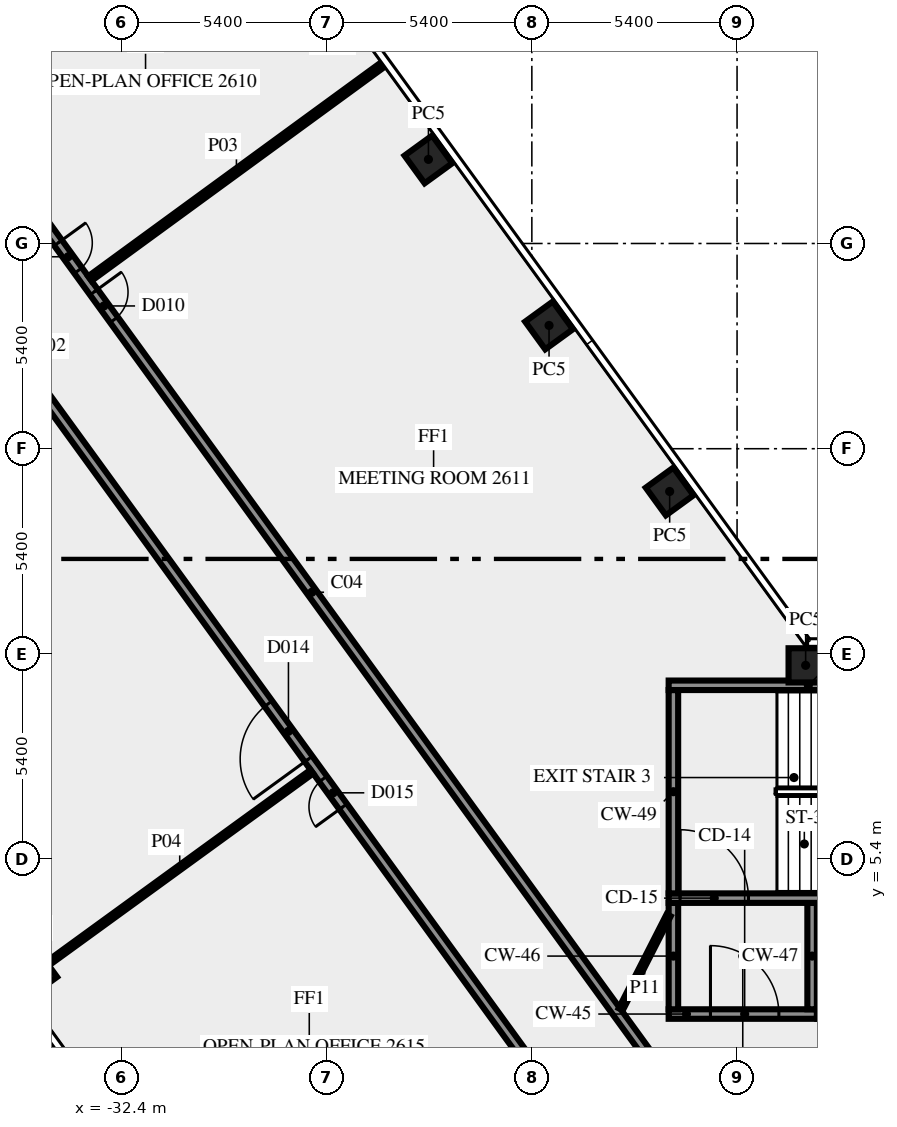
"""IFC4 building model, lengths in metres.
Left out: names, types, materials, properties, quantities, classifications, styles, units other than length and angle.
Written with IfcOpenShell. Run it as: python <this file> out.ifc"""

import sys

from ifc_helpers import new_model, si_unit, direction, frame, frame_2d, origin, origin_2d, place, context, subcontext, project, spatial, rectangle, extrude, element, fill, save


model = new_model("IFC4")
c1 = context("Model", 3, precision=1e-05, world=origin(), true_north=direction((0.0, 1.0)))
c2 = subcontext(c1, "Body", "Model", "MODEL_VIEW")
j1 = project(units=[si_unit("LENGTHUNIT", "METRE"), si_unit("PLANEANGLEUNIT", "RADIAN")], contexts=[c1])
p1 = place(None, origin())
s1 = spatial("IfcSite", under=j1, at=p1, CompositionType="ELEMENT")
p2 = place(p1, origin())
s2 = spatial("IfcBuilding", under=s1, at=p2, CompositionType="ELEMENT")
p3 = place(p2, frame((0.0, 0.0, 113.0)))
s3 = spatial("IfcBuildingStorey", under=s2, at=p3, CompositionType="ELEMENT", Elevation=113.0)
for number, where, z_axis, x_axis in (
    (1, (-17.974, 15.075, 0.0), (0.0, 0.0, 1.0), (-0.588, 0.809, 0.0)),
    (2, (-21.147, 19.444, 0.0), (0.0, 0.0, 1.0), (-0.588, 0.809, 0.0)),
    (3, (-24.321, 23.812, 0.0), (0.0, 0.0, 1.0), (-0.588, 0.809, 0.0)),
    (4, (-34.722, 2.4, 0.0), (0.0, 0.0, 1.0), (0.588, -0.809, 0.0)),
    (5, (-14.395, 10.5, 0.0), (0.0, 0.0, 1.0), (-1.0, 0.0, 0.0)),
):
    element("IfcColumn", number, at=place(p3, frame(where, z_axis=z_axis, x_axis=x_axis)), inside=s3, PredefinedType="COLUMN", context=c2, shape_type="SweptSolid", body=[
        extrude(rectangle(XDim=0.9, YDim=0.9, at=origin_2d()), origin(), (0.0, 0.0, 1.0), 3.65),
    ])
p4 = place(p3, frame((-18.0, 1.325, 0.0), z_axis=(0.0, 0.0, 1.0), x_axis=(1.0, 0.0, 0.0)))
e6 = element("IfcWall", 6, at=p4, inside=s3, PredefinedType="SHEAR", context=c2, shape_type="SweptSolid", body=[
    extrude(rectangle(XDim=3.9, YDim=0.25, at=frame_2d((1.95, 0.0))), origin(), (0.0, 0.0, 1.0), 3.65),
])
p5 = place(p4, frame((1.1, 0.0, 0.0)))
e7 = element("IfcOpeningElement", 7, at=p5, cuts=e6, PredefinedType="OPENING", context=c2, shape_type="SweptSolid", body=[
    extrude(rectangle(XDim=1.8, YDim=2.1, at=frame_2d((0.9, 1.05))), frame((0.0, 0.135, 0.0), z_axis=(0.0, -1.0, 0.0), x_axis=(1.0, 0.0, 0.0)), (0.0, 0.0, 1.0), 0.27),
])
for number, where, z_axis, x_axis in (
    (8, (-17.875, 1.45, 0.0), (0.0, 0.0, 1.0), (0.0, 1.0, 0.0)),
    (9, (-14.225, 1.45, 0.0), (0.0, 0.0, 1.0), (0.0, 1.0, 0.0)),
):
    element("IfcWall", number, at=place(p3, frame(where, z_axis=z_axis, x_axis=x_axis)), inside=s3, PredefinedType="SHEAR", context=c2, shape_type="SweptSolid", body=[
        extrude(rectangle(XDim=2.8, YDim=0.25, at=frame_2d((1.4, 0.0))), origin(), (0.0, 0.0, 1.0), 3.65),
    ])
p6 = place(p3, frame((-18.0, 4.375, 0.0), z_axis=(0.0, 0.0, 1.0), x_axis=(1.0, 0.0, 0.0)))
e10 = element("IfcWall", 10, at=p6, inside=s3, PredefinedType="SHEAR", context=c2, shape_type="SweptSolid", body=[
    extrude(rectangle(XDim=10.5, YDim=0.25, at=frame_2d((5.25, 0.0))), origin(), (0.0, 0.0, 1.0), 3.65),
])
p7 = place(p6, frame((0.3, 0.0, 0.0)))
e11 = element("IfcOpeningElement", 11, at=p7, cuts=e10, PredefinedType="OPENING", context=c2, shape_type="SweptSolid", body=[
    extrude(rectangle(XDim=1.8, YDim=2.1, at=frame_2d((0.9, 1.05))), frame((0.0, 0.135, 0.0), z_axis=(0.0, -1.0, 0.0), x_axis=(1.0, 0.0, 0.0)), (0.0, 0.0, 1.0), 0.27),
])
p8 = place(p3, frame((-17.875, 4.5, 0.0), z_axis=(0.0, 0.0, 1.0), x_axis=(0.0, 1.0, 0.0)))
e12 = element("IfcWall", 12, at=p8, inside=s3, PredefinedType="SHEAR", context=c2, shape_type="SweptSolid", body=[
    extrude(rectangle(XDim=5.35, YDim=0.25, at=frame_2d((2.675, 0.0))), origin(), (0.0, 0.0, 1.0), 3.65),
])
p9 = place(p3, frame((-18.0, 9.975, 0.0), z_axis=(0.0, 0.0, 1.0), x_axis=(1.0, 0.0, 0.0)))
e13 = element("IfcWall", 13, at=p9, inside=s3, PredefinedType="SHEAR", context=c2, shape_type="SweptSolid", body=[
    extrude(rectangle(XDim=10.5, YDim=0.25, at=frame_2d((5.25, 0.0))), origin(), (0.0, 0.0, 1.0), 3.65),
])
p10 = place(p9, frame((4.5, 0.0, 1.0)))
e14 = element("IfcOpeningElement", 14, at=p10, cuts=e13, PredefinedType="OPENING", context=c2, shape_type="SweptSolid", body=[
    extrude(rectangle(XDim=1.2, YDim=1.2, at=frame_2d((0.6, 0.6))), frame((0.0, 0.135, 0.0), z_axis=(0.0, -1.0, 0.0), x_axis=(1.0, 0.0, 0.0)), (0.0, 0.0, 1.0), 0.27),
])
p11 = place(p3, frame((-20.531, -1.523, 0.0), z_axis=(0.0, 0.0, 1.0), x_axis=(-0.587784522481, 0.809017524614, 0.0)))
e15 = element("IfcWall", 15, at=p11, inside=s3, PredefinedType="SOLIDWALL", context=c2, shape_type="SweptSolid", body=[
    extrude(rectangle(XDim=49.912, YDim=0.25, at=frame_2d((24.956, 0.0))), origin(), (0.0, 0.0, 1.0), 3.65),
])
p12 = place(p11, frame((10.266, 0.0, 0.0)))
e16 = element("IfcOpeningElement", 16, at=p12, cuts=e15, PredefinedType="OPENING", context=c2, shape_type="SweptSolid", body=[
    extrude(rectangle(XDim=0.9, YDim=2.1, at=frame_2d((0.45, 1.05))), frame((0.0, 0.135, 0.0), z_axis=(0.0, -1.0, 0.0), x_axis=(1.0, 0.0, 0.0)), (0.0, 0.0, 1.0), 0.27),
])
p13 = place(p11, frame((32.366, 0.0, 0.0)))
e17 = element("IfcOpeningElement", 17, at=p13, cuts=e15, PredefinedType="OPENING", context=c2, shape_type="SweptSolid", body=[
    extrude(rectangle(XDim=1.8, YDim=2.1, at=frame_2d((0.9, 1.05))), frame((0.0, 0.135, 0.0), z_axis=(0.0, -1.0, 0.0), x_axis=(1.0, 0.0, 0.0)), (0.0, 0.0, 1.0), 0.27),
])
p14 = place(p11, frame((11.815, 0.0, 0.0)))
e18 = element("IfcOpeningElement", 18, at=p14, cuts=e15, PredefinedType="OPENING", context=c2, shape_type="SweptSolid", body=[
    extrude(rectangle(XDim=1.8, YDim=2.1, at=frame_2d((0.9, 1.05))), frame((0.0, 0.135, 0.0), z_axis=(0.0, -1.0, 0.0), x_axis=(1.0, 0.0, 0.0)), (0.0, 0.0, 1.0), 0.27),
])
p15 = place(p11, frame((48.57, 0.0, 0.0)))
e19 = element("IfcOpeningElement", 19, at=p15, cuts=e15, PredefinedType="OPENING", context=c2, shape_type="SweptSolid", body=[
    extrude(rectangle(XDim=0.9, YDim=2.1, at=frame_2d((0.45, 1.05))), frame((0.0, 0.135, 0.0), z_axis=(0.0, -1.0, 0.0), x_axis=(1.0, 0.0, 0.0)), (0.0, 0.0, 1.0), 0.27),
])
p16 = place(p11, frame((35.915, 0.0, 0.0)))
e20 = element("IfcOpeningElement", 20, at=p16, cuts=e15, PredefinedType="OPENING", context=c2, shape_type="SweptSolid", body=[
    extrude(rectangle(XDim=0.9, YDim=2.1, at=frame_2d((0.45, 1.05))), frame((0.0, 0.135, 0.0), z_axis=(0.0, -1.0, 0.0), x_axis=(1.0, 0.0, 0.0)), (0.0, 0.0, 1.0), 0.27),
])
p17 = place(p3, frame((-37.232, 25.972, 0.0), z_axis=(0.0, 0.0, 1.0), x_axis=(0.587786323093, -0.809016216391, 0.0)))
e21 = element("IfcWall", 21, at=p17, inside=s3, PredefinedType="SOLIDWALL", context=c2, shape_type="SweptSolid", body=[
    extrude(rectangle(XDim=33.493, YDim=0.25, at=frame_2d((16.747, 0.0))), origin(), (0.0, 0.0, 1.0), 3.65),
])
p18 = place(p17, frame((5.385, 0.0, 0.0)))
e22 = element("IfcOpeningElement", 22, at=p18, cuts=e21, PredefinedType="OPENING", context=c2, shape_type="SweptSolid", body=[
    extrude(rectangle(XDim=0.9, YDim=2.1, at=frame_2d((0.45, 1.05))), frame((0.0, 0.135, 0.0), z_axis=(0.0, -1.0, 0.0), x_axis=(1.0, 0.0, 0.0)), (0.0, 0.0, 1.0), 0.27),
])
p19 = place(p17, frame((6.985, 0.0, 0.0)))
e23 = element("IfcOpeningElement", 23, at=p19, cuts=e21, PredefinedType="OPENING", context=c2, shape_type="SweptSolid", body=[
    extrude(rectangle(XDim=0.9, YDim=2.1, at=frame_2d((0.45, 1.05))), frame((0.0, 0.135, 0.0), z_axis=(0.0, -1.0, 0.0), x_axis=(1.0, 0.0, 0.0)), (0.0, 0.0, 1.0), 0.27),
])
p20 = place(p3, frame((-33.23, 20.677, 0.0), z_axis=(0.0, 0.0, 1.0), x_axis=(0.807610282865, 0.589716568371, 0.0)))
e24 = element("IfcWall", 24, at=p20, inside=s3, PredefinedType="PARTITIONING", context=c2, shape_type="SweptSolid", body=[
    extrude(rectangle(XDim=9.55, YDim=0.15, at=frame_2d((4.775, 0.0))), origin(), (0.0, 0.0, 1.0), 2.75),
])
p21 = place(p3, frame((-27.389, 7.703, 0.0), z_axis=(0.0, 0.0, 1.0), x_axis=(-0.809052894195, -0.587735837256, 0.0)))
e25 = element("IfcWall", 25, at=p21, inside=s3, PredefinedType="PARTITIONING", context=c2, shape_type="SweptSolid", body=[
    extrude(rectangle(XDim=8.594, YDim=0.12, at=frame_2d((4.297, 0.0))), origin(), (0.0, 0.0, 1.0), 3.65),
])
p22 = place(p3, frame((-19.261, 1.45, 0.0), z_axis=(0.0, 0.0, 1.0), x_axis=(0.453950796792, 0.891026752736, 0.0)))
e26 = element("IfcWall", 26, at=p22, inside=s3, PredefinedType="PARTITIONING", context=c2, shape_type="SweptSolid", body=[
    extrude(rectangle(XDim=2.778, YDim=0.12, at=frame_2d((1.389, 0.0))), origin(), (0.0, 0.0, 1.0), 3.65),
])
p23 = place(p5, origin())
e27 = element("IfcDoor", 27, at=p23, inside=s3, OperationType="DOUBLE_DOOR_SINGLE_SWING", PredefinedType="DOOR", context=c2, shape_type="SweptSolid", body=[
    extrude(rectangle(XDim=1.8, YDim=2.1, at=frame_2d((0.9, 1.05))), frame((0.0, 0.025, 0.0), z_axis=(0.0, -1.0, 0.0), x_axis=(1.0, 0.0, 0.0)), (0.0, 0.0, 1.0), 0.05),
])
fill(e7, e27)
p24 = place(p7, origin())
e28 = element("IfcDoor", 28, at=p24, inside=s3, OperationType="DOUBLE_DOOR_SINGLE_SWING", PredefinedType="DOOR", context=c2, shape_type="SweptSolid", body=[
    extrude(rectangle(XDim=1.8, YDim=2.1, at=frame_2d((0.9, 1.05))), frame((0.0, 0.025, 0.0), z_axis=(0.0, -1.0, 0.0), x_axis=(1.0, 0.0, 0.0)), (0.0, 0.0, 1.0), 0.05),
])
fill(e11, e28)
p25 = place(p18, origin())
e29 = element("IfcDoor", 29, at=p25, inside=s3, OperationType="SINGLE_SWING_RIGHT", PredefinedType="DOOR", context=c2, shape_type="SweptSolid", body=[
    extrude(rectangle(XDim=0.9, YDim=2.1, at=frame_2d((0.45, 1.05))), frame((0.0, 0.025, 0.0), z_axis=(0.0, -1.0, 0.0), x_axis=(1.0, 0.0, 0.0)), (0.0, 0.0, 1.0), 0.05),
])
fill(e22, e29)
p26 = place(p12, origin())
e30 = element("IfcDoor", 30, at=p26, inside=s3, OperationType="SINGLE_SWING_RIGHT", PredefinedType="DOOR", context=c2, shape_type="SweptSolid", body=[
    extrude(rectangle(XDim=0.9, YDim=2.1, at=frame_2d((0.45, 1.05))), frame((0.0, 0.025, 0.0), z_axis=(0.0, -1.0, 0.0), x_axis=(1.0, 0.0, 0.0)), (0.0, 0.0, 1.0), 0.05),
])
fill(e16, e30)
p27 = place(p19, origin())
e31 = element("IfcDoor", 31, at=p27, inside=s3, OperationType="SINGLE_SWING_LEFT", PredefinedType="DOOR", context=c2, shape_type="SweptSolid", body=[
    extrude(rectangle(XDim=0.9, YDim=2.1, at=frame_2d((0.45, 1.05))), frame((0.0, 0.025, 0.0), z_axis=(0.0, -1.0, 0.0), x_axis=(1.0, 0.0, 0.0)), (0.0, 0.0, 1.0), 0.05),
])
fill(e23, e31)
p28 = place(p14, origin())
e32 = element("IfcDoor", 32, at=p28, inside=s3, OperationType="DOUBLE_DOOR_SINGLE_SWING", PredefinedType="DOOR", context=c2, shape_type="SweptSolid", body=[
    extrude(rectangle(XDim=1.8, YDim=2.1, at=frame_2d((0.9, 1.05))), frame((0.0, 0.025, 0.0), z_axis=(0.0, -1.0, 0.0), x_axis=(1.0, 0.0, 0.0)), (0.0, 0.0, 1.0), 0.05),
])
fill(e18, e32)
save(model, sys.argv[1])
